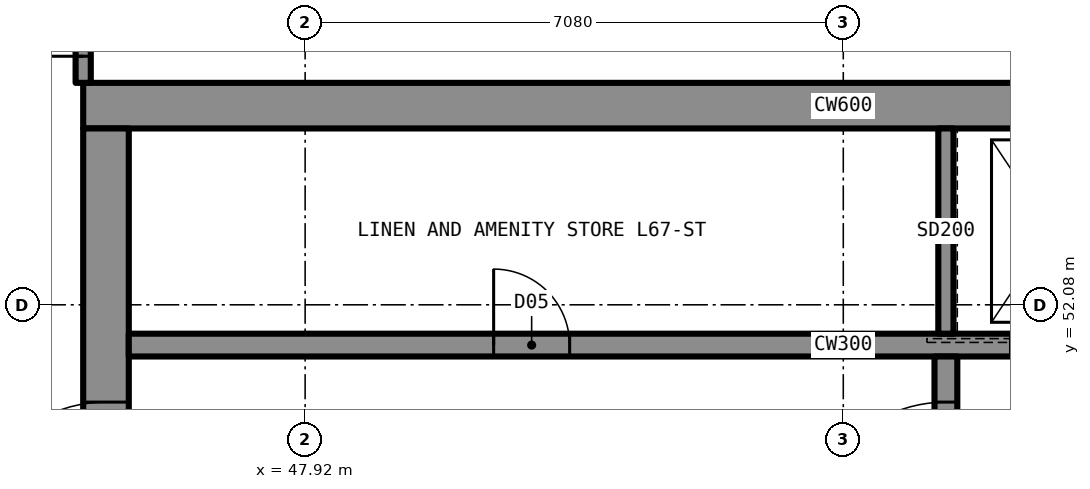
"""IFC4 building model, lengths in metres.
Left out: names, types, materials, properties, quantities, classifications, styles, units other than length and angle.
Written with IfcOpenShell. Run it as: python <this file> out.ifc"""

import sys

from ifc_helpers import new_model, si_unit, direction, frame, frame_2d, origin, place, context, subcontext, project, spatial, rectangle, extrude, element, fill, save


model = new_model("IFC4")
c1 = context("Model", 3, precision=1e-05, world=origin(), true_north=direction((0.0, 1.0)))
c2 = subcontext(c1, "Body", "Model", "MODEL_VIEW")
j1 = project(units=[si_unit("LENGTHUNIT", "METRE"), si_unit("PLANEANGLEUNIT", "RADIAN")], contexts=[c1])
p1 = place(None, origin())
s1 = spatial("IfcSite", under=j1, at=p1, CompositionType="ELEMENT")
p2 = place(p1, origin())
s2 = spatial("IfcBuilding", under=s1, at=p2, CompositionType="ELEMENT")
p3 = place(p2, frame((0.0, 0.0, 247.7)))
s3 = spatial("IfcBuildingStorey", under=s2, at=p3, CompositionType="ELEMENT", Elevation=247.7)
p4 = place(p3, frame((45.0, 54.7, 0.0), z_axis=(0.0, 0.0, 1.0), x_axis=(1.0, 0.0, 0.0)))
e1 = element("IfcWall", 1, at=p4, inside=s3, PredefinedType="SHEAR", context=c2, shape_type="SweptSolid", body=[
    extrude(rectangle(XDim=20.0, YDim=0.6, at=frame_2d((10.0, 0.0))), origin(), (0.0, 0.0, 1.0), 3.5),
])
p5 = place(p3, frame((45.3, 35.6, 0.0), z_axis=(0.0, 0.0, 1.0), x_axis=(0.0, 1.0, 0.0)))
e2 = element("IfcWall", 2, at=p5, inside=s3, PredefinedType="SHEAR", context=c2, shape_type="SweptSolid", body=[
    extrude(rectangle(XDim=18.8, YDim=0.6, at=frame_2d((9.4, 0.0))), origin(), (0.0, 0.0, 1.0), 3.5),
])
p6 = place(p5, frame((13.4, 0.0, 0.0)))
e3 = element("IfcOpeningElement", 3, at=p6, cuts=e2, PredefinedType="OPENING", context=c2, shape_type="SweptSolid", body=[
    extrude(rectangle(XDim=1.8, YDim=2.2, at=frame_2d((0.9, 1.1))), frame((0.0, 0.31, 0.0), z_axis=(0.0, -1.0, 0.0), x_axis=(1.0, 0.0, 0.0)), (0.0, 0.0, 1.0), 0.62),
])
p7 = place(p5, frame((3.6, 0.0, 0.0)))
e4 = element("IfcOpeningElement", 4, at=p7, cuts=e2, PredefinedType="OPENING", context=c2, shape_type="SweptSolid", body=[
    extrude(rectangle(XDim=1.8, YDim=2.2, at=frame_2d((0.9, 1.1))), frame((0.0, 0.31, 0.0), z_axis=(0.0, -1.0, 0.0), x_axis=(1.0, 0.0, 0.0)), (0.0, 0.0, 1.0), 0.62),
])
p8 = place(p5, frame((6.4, 0.0, 0.0)))
e5 = element("IfcOpeningElement", 5, at=p8, cuts=e2, PredefinedType="OPENING", context=c2, shape_type="SweptSolid", body=[
    extrude(rectangle(XDim=1.2, YDim=2.2, at=frame_2d((0.6, 1.1))), frame((0.0, 0.31, 0.0), z_axis=(0.0, -1.0, 0.0), x_axis=(1.0, 0.0, 0.0)), (0.0, 0.0, 1.0), 0.62),
])
p9 = place(p3, frame((45.6, 51.55, 0.0), z_axis=(0.0, 0.0, 1.0), x_axis=(1.0, 0.0, 0.0)))
e6 = element("IfcWall", 6, at=p9, inside=s3, PredefinedType="SHEAR", context=c2, shape_type="SweptSolid", body=[
    extrude(rectangle(XDim=18.8, YDim=0.3, at=frame_2d((9.4, 0.0))), origin(), (0.0, 0.0, 1.0), 3.5),
])
p10 = place(p9, frame((4.8, 0.0, 0.0)))
e7 = element("IfcOpeningElement", 7, at=p10, cuts=e6, PredefinedType="OPENING", context=c2, shape_type="SweptSolid", body=[
    extrude(rectangle(XDim=1.0, YDim=2.1, at=frame_2d((0.5, 1.05))), frame((0.0, 0.16, 0.0), z_axis=(0.0, -1.0, 0.0), x_axis=(1.0, 0.0, 0.0)), (0.0, 0.0, 1.0), 0.32),
])
p11 = place(p9, frame((11.6, 0.0, 0.0)))
e8 = element("IfcOpeningElement", 8, at=p11, cuts=e6, PredefinedType="OPENING", context=c2, shape_type="SweptSolid", body=[
    extrude(rectangle(XDim=1.1, YDim=2.2, at=frame_2d((0.55, 1.1))), frame((0.0, 0.16, 0.0), z_axis=(0.0, -1.0, 0.0), x_axis=(1.0, 0.0, 0.0)), (0.0, 0.0, 1.0), 0.32),
])
p12 = place(p9, frame((14.3, 0.0, 0.0)))
e9 = element("IfcOpeningElement", 9, at=p12, cuts=e6, PredefinedType="OPENING", context=c2, shape_type="SweptSolid", body=[
    extrude(rectangle(XDim=1.1, YDim=2.2, at=frame_2d((0.55, 1.1))), frame((0.0, 0.16, 0.0), z_axis=(0.0, -1.0, 0.0), x_axis=(1.0, 0.0, 0.0)), (0.0, 0.0, 1.0), 0.32),
])
p13 = place(p3, frame((56.35, 41.9, 0.0), z_axis=(0.0, 0.0, 1.0), x_axis=(0.0, 1.0, 0.0)))
e10 = element("IfcWall", 10, at=p13, inside=s3, PredefinedType="SHEAR", context=c2, shape_type="SweptSolid", body=[
    extrude(rectangle(XDim=9.5, YDim=0.3, at=frame_2d((4.75, 0.0))), origin(), (0.0, 0.0, 1.0), 3.5),
])
p14 = place(p13, frame((7.1, 0.0, 0.0)))
e11 = element("IfcOpeningElement", 11, at=p14, cuts=e10, PredefinedType="OPENING", context=c2, shape_type="SweptSolid", body=[
    extrude(rectangle(XDim=1.8, YDim=2.2, at=frame_2d((0.9, 1.1))), frame((0.0, 0.16, 0.0), z_axis=(0.0, -1.0, 0.0), x_axis=(1.0, 0.0, 0.0)), (0.0, 0.0, 1.0), 0.32),
])
p15 = place(p3, frame((45.0, 55.0, 0.0), z_axis=(0.0, 0.0, 1.0), x_axis=(0.0, 1.0, 0.0)))
e12 = element("IfcWall", 12, at=p15, inside=s3, PredefinedType="PARTITIONING", context=c2, shape_type="SweptSolid", body=[
    extrude(rectangle(XDim=1.8, YDim=0.2, at=frame_2d((0.9, 0.0))), origin(), (0.0, 0.0, 1.0), 3.33),
])
p16 = place(p15, frame((0.35, 0.0, 0.0)))
e13 = element("IfcOpeningElement", 13, at=p16, cuts=e12, PredefinedType="OPENING", context=c2, shape_type="SweptSolid", body=[
    extrude(rectangle(XDim=1.1, YDim=2.2, at=frame_2d((0.55, 1.1))), frame((0.0, 0.11, 0.0), z_axis=(0.0, -1.0, 0.0), x_axis=(1.0, 0.0, 0.0)), (0.0, 0.0, 1.0), 0.22),
])
p17 = place(p3, frame((56.35, 51.7, 0.0), z_axis=(0.0, 0.0, 1.0), x_axis=(0.0, 1.0, 0.0)))
e14 = element("IfcWall", 14, at=p17, inside=s3, PredefinedType="PARTITIONING", context=c2, shape_type="SweptSolid", body=[
    extrude(rectangle(XDim=2.7, YDim=0.2, at=frame_2d((1.35, 0.0))), origin(), (0.0, 0.0, 1.0), 3.33),
])
p18 = place(p16, origin())
e15 = element("IfcDoor", 15, at=p18, inside=s3, OperationType="SINGLE_SWING_LEFT", PredefinedType="DOOR", context=c2, shape_type="SweptSolid", body=[
    extrude(rectangle(XDim=1.1, YDim=2.2, at=frame_2d((0.55, 1.1))), frame((0.0, 0.025, 0.0), z_axis=(0.0, -1.0, 0.0), x_axis=(1.0, 0.0, 0.0)), (0.0, 0.0, 1.0), 0.05),
])
fill(e13, e15)
p19 = place(p6, origin())
e16 = element("IfcDoor", 16, at=p19, inside=s3, OperationType="DOUBLE_DOOR_SINGLE_SWING", PredefinedType="DOOR", context=c2, shape_type="SweptSolid", body=[
    extrude(rectangle(XDim=1.8, YDim=2.2, at=frame_2d((0.9, 1.1))), frame((0.0, 0.025, 0.0), z_axis=(0.0, -1.0, 0.0), x_axis=(1.0, 0.0, 0.0)), (0.0, 0.0, 1.0), 0.05),
])
fill(e3, e16)
p20 = place(p14, origin())
e17 = element("IfcDoor", 17, at=p20, inside=s3, OperationType="DOUBLE_DOOR_SINGLE_SWING", PredefinedType="DOOR", context=c2, shape_type="SweptSolid", body=[
    extrude(rectangle(XDim=1.8, YDim=2.2, at=frame_2d((0.9, 1.1))), frame((0.0, 0.025, 0.0), z_axis=(0.0, -1.0, 0.0), x_axis=(1.0, 0.0, 0.0)), (0.0, 0.0, 1.0), 0.05),
])
fill(e11, e17)
p21 = place(p10, origin())
e18 = element("IfcDoor", 18, at=p21, inside=s3, OperationType="SINGLE_SWING_LEFT", PredefinedType="DOOR", context=c2, shape_type="SweptSolid", body=[
    extrude(rectangle(XDim=1.0, YDim=2.1, at=frame_2d((0.5, 1.05))), frame((0.0, 0.025, 0.0), z_axis=(0.0, -1.0, 0.0), x_axis=(1.0, 0.0, 0.0)), (0.0, 0.0, 1.0), 0.05),
])
fill(e7, e18)
save(model, sys.argv[1])
